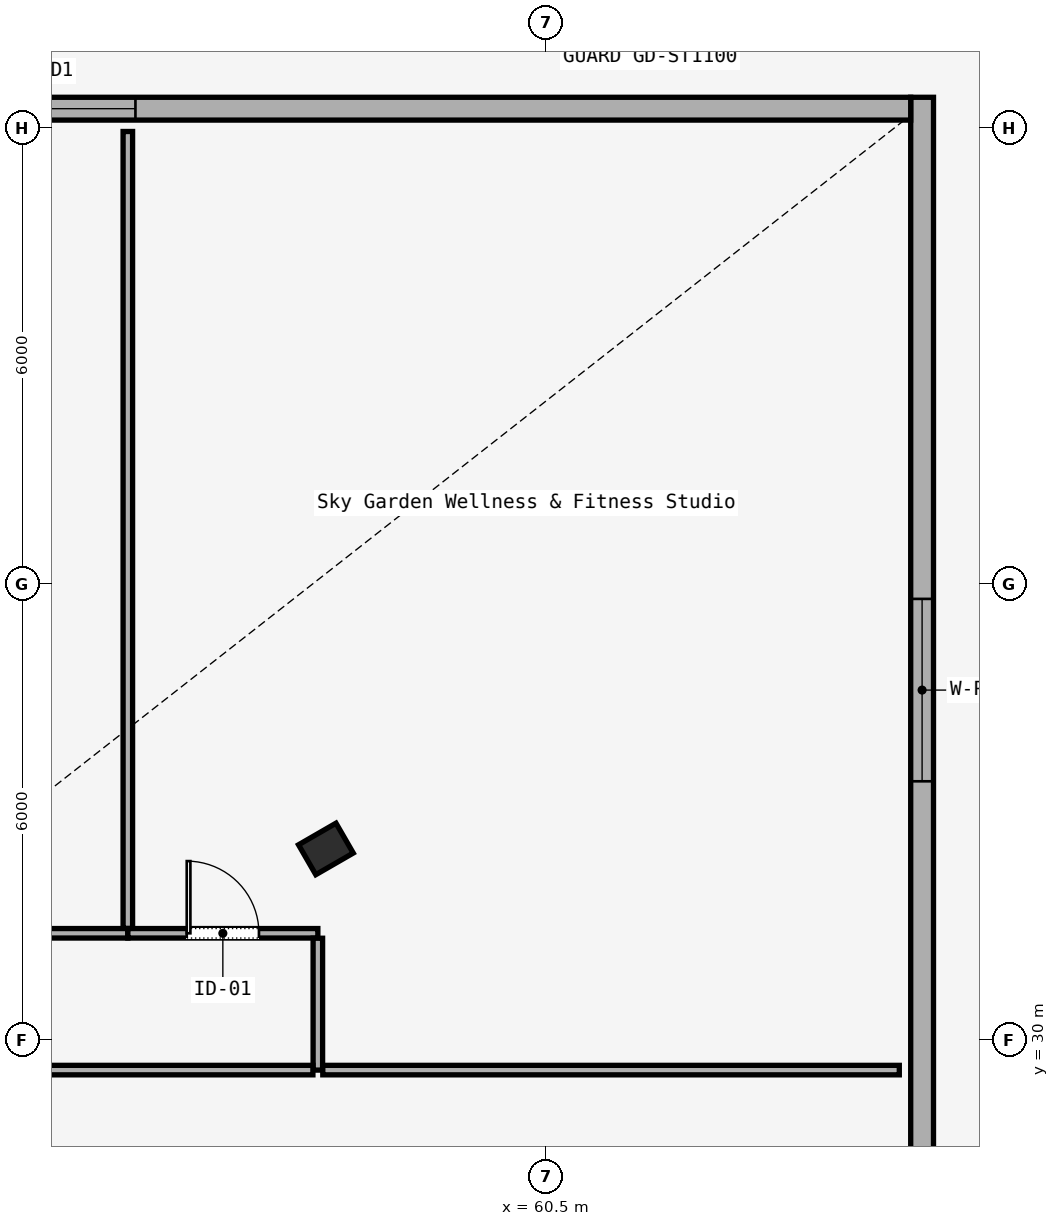
"""IFC4 building model, lengths in metres.
Left out: names, types, materials, properties, quantities, classifications, styles, units other than length and angle.
Written with IfcOpenShell. Run it as: python <this file> out.ifc"""

import sys

from ifc_helpers import new_model, si_unit, direction, frame, frame_2d, origin, origin_2d, place, context, subcontext, project, spatial, rectangle, i_section, extrude, element, fill, save


model = new_model("IFC4")
c1 = context("Model", 3, precision=1e-05, world=origin(), true_north=direction((0.0, 1.0)))
c2 = subcontext(c1, "Body", "Model", "MODEL_VIEW")
j1 = project(units=[si_unit("LENGTHUNIT", "METRE"), si_unit("PLANEANGLEUNIT", "RADIAN")], contexts=[c1])
p1 = place(None, origin())
s1 = spatial("IfcSite", under=j1, at=p1, CompositionType="ELEMENT")
p2 = place(p1, origin())
s2 = spatial("IfcBuilding", under=s1, at=p2, CompositionType="ELEMENT")
p3 = place(p2, frame((0.0, 0.0, 30.0)))
s3 = spatial("IfcBuildingStorey", under=s2, at=p3, CompositionType="ELEMENT", Elevation=30.0)
p4 = place(p3, frame((57.606, 32.51, 0.0), z_axis=(0.0, 0.0, 1.0), x_axis=(-0.5, 0.866025403784, 0.0)))
e1 = element("IfcColumn", 1, at=p4, inside=s3, PredefinedType="COLUMN", context=c2, shape_type="SweptSolid", body=[
    extrude(i_section(OverallWidth=0.454, OverallDepth=0.569, WebThickness=0.078, FlangeThickness=0.08, FilletRadius=0.015, at=origin_2d()), origin(), (0.0, 0.0, 1.0), 6.0),
])
p5 = place(p3, frame((65.45, 5.4, 0.0), z_axis=(0.0, 0.0, 1.0), x_axis=(0.0, 1.0, 0.0)))
e2 = element("IfcWall", 2, at=p5, inside=s3, PredefinedType="SOLIDWALL", context=c2, shape_type="SweptSolid", body=[
    extrude(rectangle(XDim=37.0, YDim=0.3, at=frame_2d((18.5, 0.0))), origin(), (0.0, 0.0, 1.0), 5.78),
])
p6 = place(p5, frame((10.2, 0.0, 0.0)))
e3 = element("IfcOpeningElement", 3, at=p6, cuts=e2, PredefinedType="OPENING", context=c2, shape_type="SweptSolid", body=[
    extrude(rectangle(XDim=1.8, YDim=2.4, at=frame_2d((0.9, 1.2))), frame((0.0, 0.15, 0.0), z_axis=(0.0, -1.0, 0.0), x_axis=(1.0, 0.0, 0.0)), (0.0, 0.0, 1.0), 0.3),
])
p7 = place(p5, frame((20.0, 0.0, 0.0)))
e4 = element("IfcOpeningElement", 4, at=p7, cuts=e2, PredefinedType="OPENING", context=c2, shape_type="SweptSolid", body=[
    extrude(rectangle(XDim=1.8, YDim=2.4, at=frame_2d((0.9, 1.2))), frame((0.0, 0.15, 0.0), z_axis=(0.0, -1.0, 0.0), x_axis=(1.0, 0.0, 0.0)), (0.0, 0.0, 1.0), 0.3),
])
p8 = place(p5, frame((14.5, 0.0, 0.9)))
e5 = element("IfcOpeningElement", 5, at=p8, cuts=e2, PredefinedType="OPENING", context=c2, shape_type="SweptSolid", body=[
    extrude(rectangle(XDim=2.4, YDim=2.2, at=frame_2d((1.2, 1.1))), frame((0.0, 0.15, 0.0), z_axis=(0.0, -1.0, 0.0), x_axis=(1.0, 0.0, 0.0)), (0.0, 0.0, 1.0), 0.3),
])
p9 = place(p5, frame((28.0, 0.0, 0.9)))
e6 = element("IfcOpeningElement", 6, at=p9, cuts=e2, PredefinedType="OPENING", context=c2, shape_type="SweptSolid", body=[
    extrude(rectangle(XDim=2.4, YDim=2.2, at=frame_2d((1.2, 1.1))), frame((0.0, 0.15, 0.0), z_axis=(0.0, -1.0, 0.0), x_axis=(1.0, 0.0, 0.0)), (0.0, 0.0, 1.0), 0.3),
])
p10 = place(p3, frame((18.7, 42.25, 0.0), z_axis=(0.0, 0.0, 1.0), x_axis=(1.0, 0.0, 0.0)))
e7 = element("IfcWall", 7, at=p10, inside=s3, PredefinedType="SOLIDWALL", context=c2, shape_type="SweptSolid", body=[
    extrude(rectangle(XDim=46.6, YDim=0.3, at=frame_2d((23.3, 0.0))), origin(), (0.0, 0.0, 1.0), 5.78),
])
p11 = place(p10, frame((22.7, 0.0, 0.0)))
e8 = element("IfcOpeningElement", 8, at=p11, cuts=e7, PredefinedType="OPENING", context=c2, shape_type="SweptSolid", body=[
    extrude(rectangle(XDim=1.8, YDim=2.4, at=frame_2d((0.9, 1.2))), frame((0.0, 0.15, 0.0), z_axis=(0.0, -1.0, 0.0), x_axis=(1.0, 0.0, 0.0)), (0.0, 0.0, 1.0), 0.3),
])
p12 = place(p10, frame((8.0, 0.0, 0.9)))
e9 = element("IfcOpeningElement", 9, at=p12, cuts=e7, PredefinedType="OPENING", context=c2, shape_type="SweptSolid", body=[
    extrude(rectangle(XDim=2.4, YDim=2.2, at=frame_2d((1.2, 1.1))), frame((0.0, 0.15, 0.0), z_axis=(0.0, -1.0, 0.0), x_axis=(1.0, 0.0, 0.0)), (0.0, 0.0, 1.0), 0.3),
])
p13 = place(p10, frame((34.0, 0.0, 0.9)))
e10 = element("IfcOpeningElement", 10, at=p13, cuts=e7, PredefinedType="OPENING", context=c2, shape_type="SweptSolid", body=[
    extrude(rectangle(XDim=2.4, YDim=2.2, at=frame_2d((1.2, 1.1))), frame((0.0, 0.15, 0.0), z_axis=(0.0, -1.0, 0.0), x_axis=(1.0, 0.0, 0.0)), (0.0, 0.0, 1.0), 0.3),
])
p14 = place(p3, frame((43.065, 31.4, 0.0), z_axis=(0.0, 0.0, 1.0), x_axis=(1.0, 0.0, 0.0)))
e11 = element("IfcWall", 11, at=p14, inside=s3, PredefinedType="PARTITIONING", context=c2, shape_type="SweptSolid", body=[
    extrude(rectangle(XDim=11.935, YDim=0.125, at=frame_2d((5.968, 0.0))), origin(), (0.0, 0.0, 1.0), 5.133),
])
p15 = place(p14, frame((5.268, 0.0, 0.0)))
e12 = element("IfcOpeningElement", 12, at=p15, cuts=e11, PredefinedType="OPENING", context=c2, shape_type="SweptSolid", body=[
    extrude(rectangle(XDim=1.4, YDim=2.2, at=frame_2d((0.7, 1.1))), frame((0.0, 0.062, 0.0), z_axis=(0.0, -1.0, 0.0), x_axis=(1.0, 0.0, 0.0)), (0.0, 0.0, 1.0), 0.125),
])
p16 = place(p3, frame((55.0, 31.4, 0.0), z_axis=(0.0, 0.0, 1.0), x_axis=(1.0, 0.0, 0.0)))
e13 = element("IfcWall", 13, at=p16, inside=s3, PredefinedType="PARTITIONING", context=c2, shape_type="SweptSolid", body=[
    extrude(rectangle(XDim=2.5, YDim=0.125, at=frame_2d((1.25, 0.0))), origin(), (0.0, 0.0, 1.0), 5.133),
])
p17 = place(p16, frame((0.775, 0.0, 0.0)))
e14 = element("IfcOpeningElement", 14, at=p17, cuts=e13, PredefinedType="OPENING", context=c2, shape_type="SweptSolid", body=[
    extrude(rectangle(XDim=0.95, YDim=2.2, at=frame_2d((0.475, 1.1))), frame((0.0, 0.062, 0.0), z_axis=(0.0, -1.0, 0.0), x_axis=(1.0, 0.0, 0.0)), (0.0, 0.0, 1.0), 0.125),
])
p18 = place(p3, frame((57.5, 31.335, 0.0), z_axis=(0.0, 0.0, 1.0), x_axis=(0.0, -1.0, 0.0)))
e15 = element("IfcWall", 15, at=p18, inside=s3, PredefinedType="PARTITIONING", context=c2, shape_type="SweptSolid", body=[
    extrude(rectangle(XDim=1.735, YDim=0.125, at=frame_2d((0.867, 0.0))), origin(), (0.0, 0.0, 1.0), 5.133),
])
p19 = place(p3, frame((57.435, 29.6, 0.0), z_axis=(0.0, 0.0, 1.0), x_axis=(-1.0, 0.0, 0.0)))
e16 = element("IfcWall", 16, at=p19, inside=s3, PredefinedType="PARTITIONING", context=c2, shape_type="SweptSolid", body=[
    extrude(rectangle(XDim=14.435, YDim=0.125, at=frame_2d((7.218, 0.0))), origin(), (0.0, 0.0, 1.0), 5.133),
])
p20 = place(p3, frame((57.565, 29.6, 0.0), z_axis=(0.0, 0.0, 1.0), x_axis=(1.0, 0.0, 0.0)))
e17 = element("IfcWall", 17, at=p20, inside=s3, PredefinedType="PARTITIONING", context=c2, shape_type="SweptSolid", body=[
    extrude(rectangle(XDim=7.585, YDim=0.125, at=frame_2d((3.792, 0.0))), origin(), (0.0, 0.0, 1.0), 5.133),
])
p21 = place(p3, frame((55.0, 41.95, 0.0), z_axis=(0.0, 0.0, 1.0), x_axis=(0.0, -1.0, 0.0)))
e18 = element("IfcWall", 18, at=p21, inside=s3, PredefinedType="PARTITIONING", context=c2, shape_type="SweptSolid", body=[
    extrude(rectangle(XDim=10.485, YDim=0.125, at=frame_2d((5.242, 0.0))), origin(), (0.0, 0.0, 1.0), 5.133),
])
p22 = place(p9, origin())
e19 = element("IfcWindow", 19, at=p22, inside=s3, PartitioningType="SINGLE_PANEL", PredefinedType="WINDOW", context=c2, shape_type="SweptSolid", body=[
    extrude(rectangle(XDim=2.4, YDim=2.2, at=frame_2d((1.2, 1.1))), frame((0.0, 0.03, 0.0), z_axis=(0.0, -1.0, 0.0), x_axis=(1.0, 0.0, 0.0)), (0.0, 0.0, 1.0), 0.06),
])
fill(e6, e19)
p23 = place(p13, origin())
e20 = element("IfcWindow", 20, at=p23, inside=s3, PartitioningType="SINGLE_PANEL", PredefinedType="WINDOW", context=c2, shape_type="SweptSolid", body=[
    extrude(rectangle(XDim=2.4, YDim=2.2, at=frame_2d((1.2, 1.1))), frame((0.0, 0.03, 0.0), z_axis=(0.0, -1.0, 0.0), x_axis=(1.0, 0.0, 0.0)), (0.0, 0.0, 1.0), 0.06),
])
fill(e10, e20)
p24 = place(p17, origin())
e21 = element("IfcDoor", 21, at=p24, inside=s3, OperationType="SINGLE_SWING_RIGHT", PredefinedType="DOOR", context=c2, shape_type="SweptSolid", body=[
    extrude(rectangle(XDim=0.95, YDim=2.2, at=frame_2d((0.475, 1.1))), frame((0.0, 0.025, 0.0), z_axis=(0.0, -1.0, 0.0), x_axis=(1.0, 0.0, 0.0)), (0.0, 0.0, 1.0), 0.05),
])
fill(e14, e21)
save(model, sys.argv[1])
